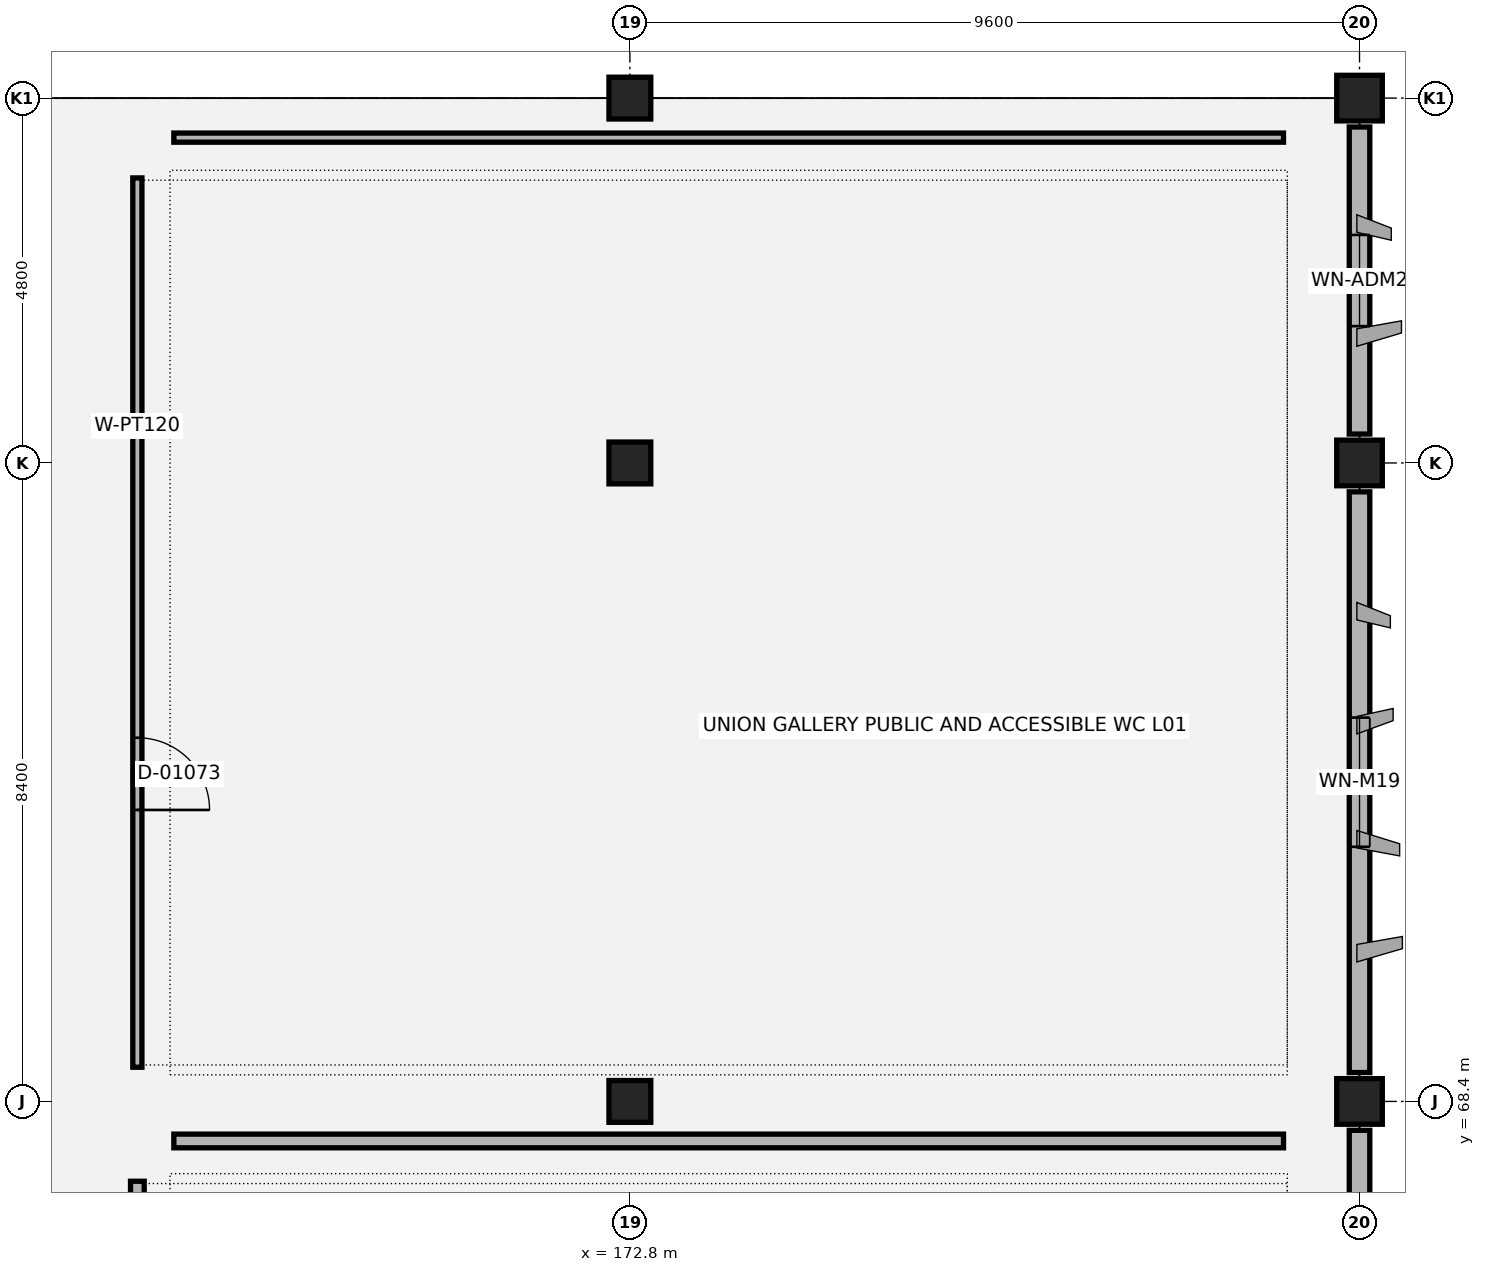
"""IFC4 building model, lengths in metres.
Left out: names, types, materials, properties, quantities, classifications, styles, units other than length and angle.
Written with IfcOpenShell. Run it as: python <this file> out.ifc"""

import sys

from ifc_helpers import new_model, si_unit, direction, frame, frame_2d, origin, origin_2d, place, context, subcontext, project, spatial, rectangle, extrude, element, fill, save


model = new_model("IFC4")
c1 = context("Model", 3, precision=1e-05, world=origin(), true_north=direction((0.0, 1.0)))
c2 = subcontext(c1, "Body", "Model", "MODEL_VIEW")
j1 = project(units=[si_unit("LENGTHUNIT", "METRE"), si_unit("PLANEANGLEUNIT", "RADIAN")], contexts=[c1])
p1 = place(None, origin())
s1 = spatial("IfcSite", under=j1, at=p1, CompositionType="ELEMENT")
p2 = place(p1, origin())
s2 = spatial("IfcBuilding", under=s1, at=p2, CompositionType="ELEMENT")
p3 = place(p2, frame((0.0, 0.0, 5.4)))
s3 = spatial("IfcBuildingStorey", under=s2, at=p3, CompositionType="ELEMENT", Elevation=5.4)
for number, where, z_axis, x_axis in (
    (1, (172.8, 68.4, 0.0), (0.0, 0.0, 1.0), (1.0, 0.0, 0.0)),
    (2, (172.8, 76.8, 0.0), (0.0, 0.0, 1.0), (1.0, 0.0, 0.0)),
    (3, (172.8, 81.6, 0.0), (0.0, 0.0, 1.0), (1.0, 0.0, 0.0)),
):
    element("IfcColumn", number, at=place(p3, frame(where, z_axis=z_axis, x_axis=x_axis)), inside=s3, PredefinedType="COLUMN", context=c2, shape_type="SweptSolid", body=[
        extrude(rectangle(XDim=0.55, YDim=0.55, at=origin_2d()), origin(), (0.0, 0.0, 1.0), 4.8),
    ])
for number, where, z_axis, x_axis in (
    (4, (182.4, 68.4, 0.0), (0.0, 0.0, 1.0), (1.0, 0.0, 0.0)),
    (5, (182.4, 76.8, 0.0), (0.0, 0.0, 1.0), (1.0, 0.0, 0.0)),
    (6, (182.4, 81.6, 0.0), (0.0, 0.0, 1.0), (1.0, 0.0, 0.0)),
):
    element("IfcColumn", number, at=place(p3, frame(where, z_axis=z_axis, x_axis=x_axis)), inside=s3, PredefinedType="COLUMN", context=c2, shape_type="SweptSolid", body=[
        extrude(rectangle(XDim=0.6, YDim=0.6, at=origin_2d()), origin(), (0.0, 0.0, 1.0), 4.8),
    ])
p4 = place(p3, frame((182.4, 60.38, 0.0), z_axis=(0.0, 0.0, 1.0), x_axis=(0.0, 1.0, 0.0)))
e7 = element("IfcWall", 7, at=p4, inside=s3, PredefinedType="SOLIDWALL", context=c2, shape_type="SweptSolid", body=[
    extrude(rectangle(XDim=7.64, YDim=0.27, at=frame_2d((3.82, 0.0))), origin(), (0.0, 0.0, 1.0), 3.28),
])
p5 = place(p4, frame((2.495, 0.0, 0.9)))
e8 = element("IfcOpeningElement", 8, at=p5, cuts=e7, PredefinedType="OPENING", context=c2, shape_type="SweptSolid", body=[
    extrude(rectangle(XDim=2.65, YDim=1.75, at=frame_2d((1.325, 0.875))), frame((0.0, 0.145, 0.0), z_axis=(0.0, -1.0, 0.0), x_axis=(1.0, 0.0, 0.0)), (0.0, 0.0, 1.0), 0.29),
])
p6 = place(p3, frame((182.4, 68.78, 0.0), z_axis=(0.0, 0.0, 1.0), x_axis=(0.0, 1.0, 0.0)))
e9 = element("IfcWall", 9, at=p6, inside=s3, PredefinedType="SOLIDWALL", context=c2, shape_type="SweptSolid", body=[
    extrude(rectangle(XDim=7.64, YDim=0.27, at=frame_2d((3.82, 0.0))), origin(), (0.0, 0.0, 1.0), 3.28),
])
p7 = place(p6, frame((2.97, 0.0, 0.9)))
e10 = element("IfcOpeningElement", 10, at=p7, cuts=e9, PredefinedType="OPENING", context=c2, shape_type="SweptSolid", body=[
    extrude(rectangle(XDim=1.7, YDim=1.45, at=frame_2d((0.85, 0.725))), frame((0.0, 0.145, 0.0), z_axis=(0.0, -1.0, 0.0), x_axis=(1.0, 0.0, 0.0)), (0.0, 0.0, 1.0), 0.29),
])
p8 = place(p3, frame((182.4, 77.18, 0.0), z_axis=(0.0, 0.0, 1.0), x_axis=(0.0, 1.0, 0.0)))
e11 = element("IfcWall", 11, at=p8, inside=s3, PredefinedType="SOLIDWALL", context=c2, shape_type="SweptSolid", body=[
    extrude(rectangle(XDim=4.04, YDim=0.27, at=frame_2d((2.02, 0.0))), origin(), (0.0, 0.0, 1.0), 3.28),
])
p9 = place(p8, frame((1.42, 0.0, 0.9)))
e12 = element("IfcOpeningElement", 12, at=p9, cuts=e11, PredefinedType="OPENING", context=c2, shape_type="SweptSolid", body=[
    extrude(rectangle(XDim=1.2, YDim=1.4, at=frame_2d((0.6, 0.7))), frame((0.0, 0.145, 0.0), z_axis=(0.0, -1.0, 0.0), x_axis=(1.0, 0.0, 0.0)), (0.0, 0.0, 1.0), 0.29),
])
p10 = place(p3, frame((166.32, 38.85, 0.0), z_axis=(0.0, 0.0, 1.0), x_axis=(0.0, 1.0, 0.0)))
e13 = element("IfcWall", 13, at=p10, inside=s3, PredefinedType="PARTITIONING", context=c2, shape_type="SweptSolid", body=[
    extrude(rectangle(XDim=28.5, YDim=0.18, at=frame_2d((14.25, 0.0))), origin(), (0.0, 0.0, 1.0), 3.26),
])
p11 = place(p10, frame((15.97, 0.0, 0.0)))
e14 = element("IfcOpeningElement", 14, at=p11, cuts=e13, PredefinedType="OPENING", context=c2, shape_type="SweptSolid", body=[
    extrude(rectangle(XDim=1.75, YDim=2.15, at=frame_2d((0.875, 1.075))), frame((0.0, 0.1, 0.0), z_axis=(0.0, -1.0, 0.0), x_axis=(1.0, 0.0, 0.0)), (0.0, 0.0, 1.0), 0.2),
])
p12 = place(p3, frame((166.8, 67.88, 0.0), z_axis=(0.0, 0.0, 1.0), x_axis=(1.0, 0.0, 0.0)))
e15 = element("IfcWall", 15, at=p12, inside=s3, PredefinedType="PARTITIONING", context=c2, shape_type="SweptSolid", body=[
    extrude(rectangle(XDim=14.6, YDim=0.18, at=frame_2d((7.3, 0.0))), origin(), (0.0, 0.0, 1.0), 3.26),
])
p13 = place(p3, frame((166.32, 68.85, 0.0), z_axis=(0.0, 0.0, 1.0), x_axis=(0.0, 1.0, 0.0)))
e16 = element("IfcWall", 16, at=p13, inside=s3, PredefinedType="PARTITIONING", context=c2, shape_type="SweptSolid", body=[
    extrude(rectangle(XDim=11.7, YDim=0.12, at=frame_2d((5.85, 0.0))), origin(), (0.0, 0.0, 1.0), 3.26),
])
p14 = place(p13, frame((3.385, 0.0, 0.0)))
e17 = element("IfcOpeningElement", 17, at=p14, cuts=e16, PredefinedType="OPENING", context=c2, shape_type="SweptSolid", body=[
    extrude(rectangle(XDim=0.95, YDim=2.1, at=frame_2d((0.475, 1.05))), frame((0.0, 0.07, 0.0), z_axis=(0.0, -1.0, 0.0), x_axis=(1.0, 0.0, 0.0)), (0.0, 0.0, 1.0), 0.14),
])
p15 = place(p3, frame((166.8, 81.08, 0.0), z_axis=(0.0, 0.0, 1.0), x_axis=(1.0, 0.0, 0.0)))
e18 = element("IfcWall", 18, at=p15, inside=s3, PredefinedType="PARTITIONING", context=c2, shape_type="SweptSolid", body=[
    extrude(rectangle(XDim=14.6, YDim=0.12, at=frame_2d((7.3, 0.0))), origin(), (0.0, 0.0, 1.0), 3.26),
])
p16 = place(p7, origin())
e19 = element("IfcWindow", 19, at=p16, inside=s3, PartitioningType="SINGLE_PANEL", PredefinedType="WINDOW", context=c2, shape_type="SweptSolid", body=[
    extrude(rectangle(XDim=1.7, YDim=1.45, at=frame_2d((0.85, 0.725))), frame((0.0, 0.03, 0.0), z_axis=(0.0, -1.0, 0.0), x_axis=(1.0, 0.0, 0.0)), (0.0, 0.0, 1.0), 0.06),
])
fill(e10, e19)
p17 = place(p9, origin())
e20 = element("IfcWindow", 20, at=p17, inside=s3, PartitioningType="SINGLE_PANEL", PredefinedType="WINDOW", context=c2, shape_type="SweptSolid", body=[
    extrude(rectangle(XDim=1.2, YDim=1.4, at=frame_2d((0.6, 0.7))), frame((0.0, 0.03, 0.0), z_axis=(0.0, -1.0, 0.0), x_axis=(1.0, 0.0, 0.0)), (0.0, 0.0, 1.0), 0.06),
])
fill(e12, e20)
p18 = place(p14, origin())
e21 = element("IfcDoor", 21, at=p18, inside=s3, OperationType="SINGLE_SWING_RIGHT", PredefinedType="DOOR", context=c2, shape_type="SweptSolid", body=[
    extrude(rectangle(XDim=0.95, YDim=2.1, at=frame_2d((0.475, 1.05))), frame((0.0, 0.025, 0.0), z_axis=(0.0, -1.0, 0.0), x_axis=(1.0, 0.0, 0.0)), (0.0, 0.0, 1.0), 0.05),
])
fill(e17, e21)
save(model, sys.argv[1])
